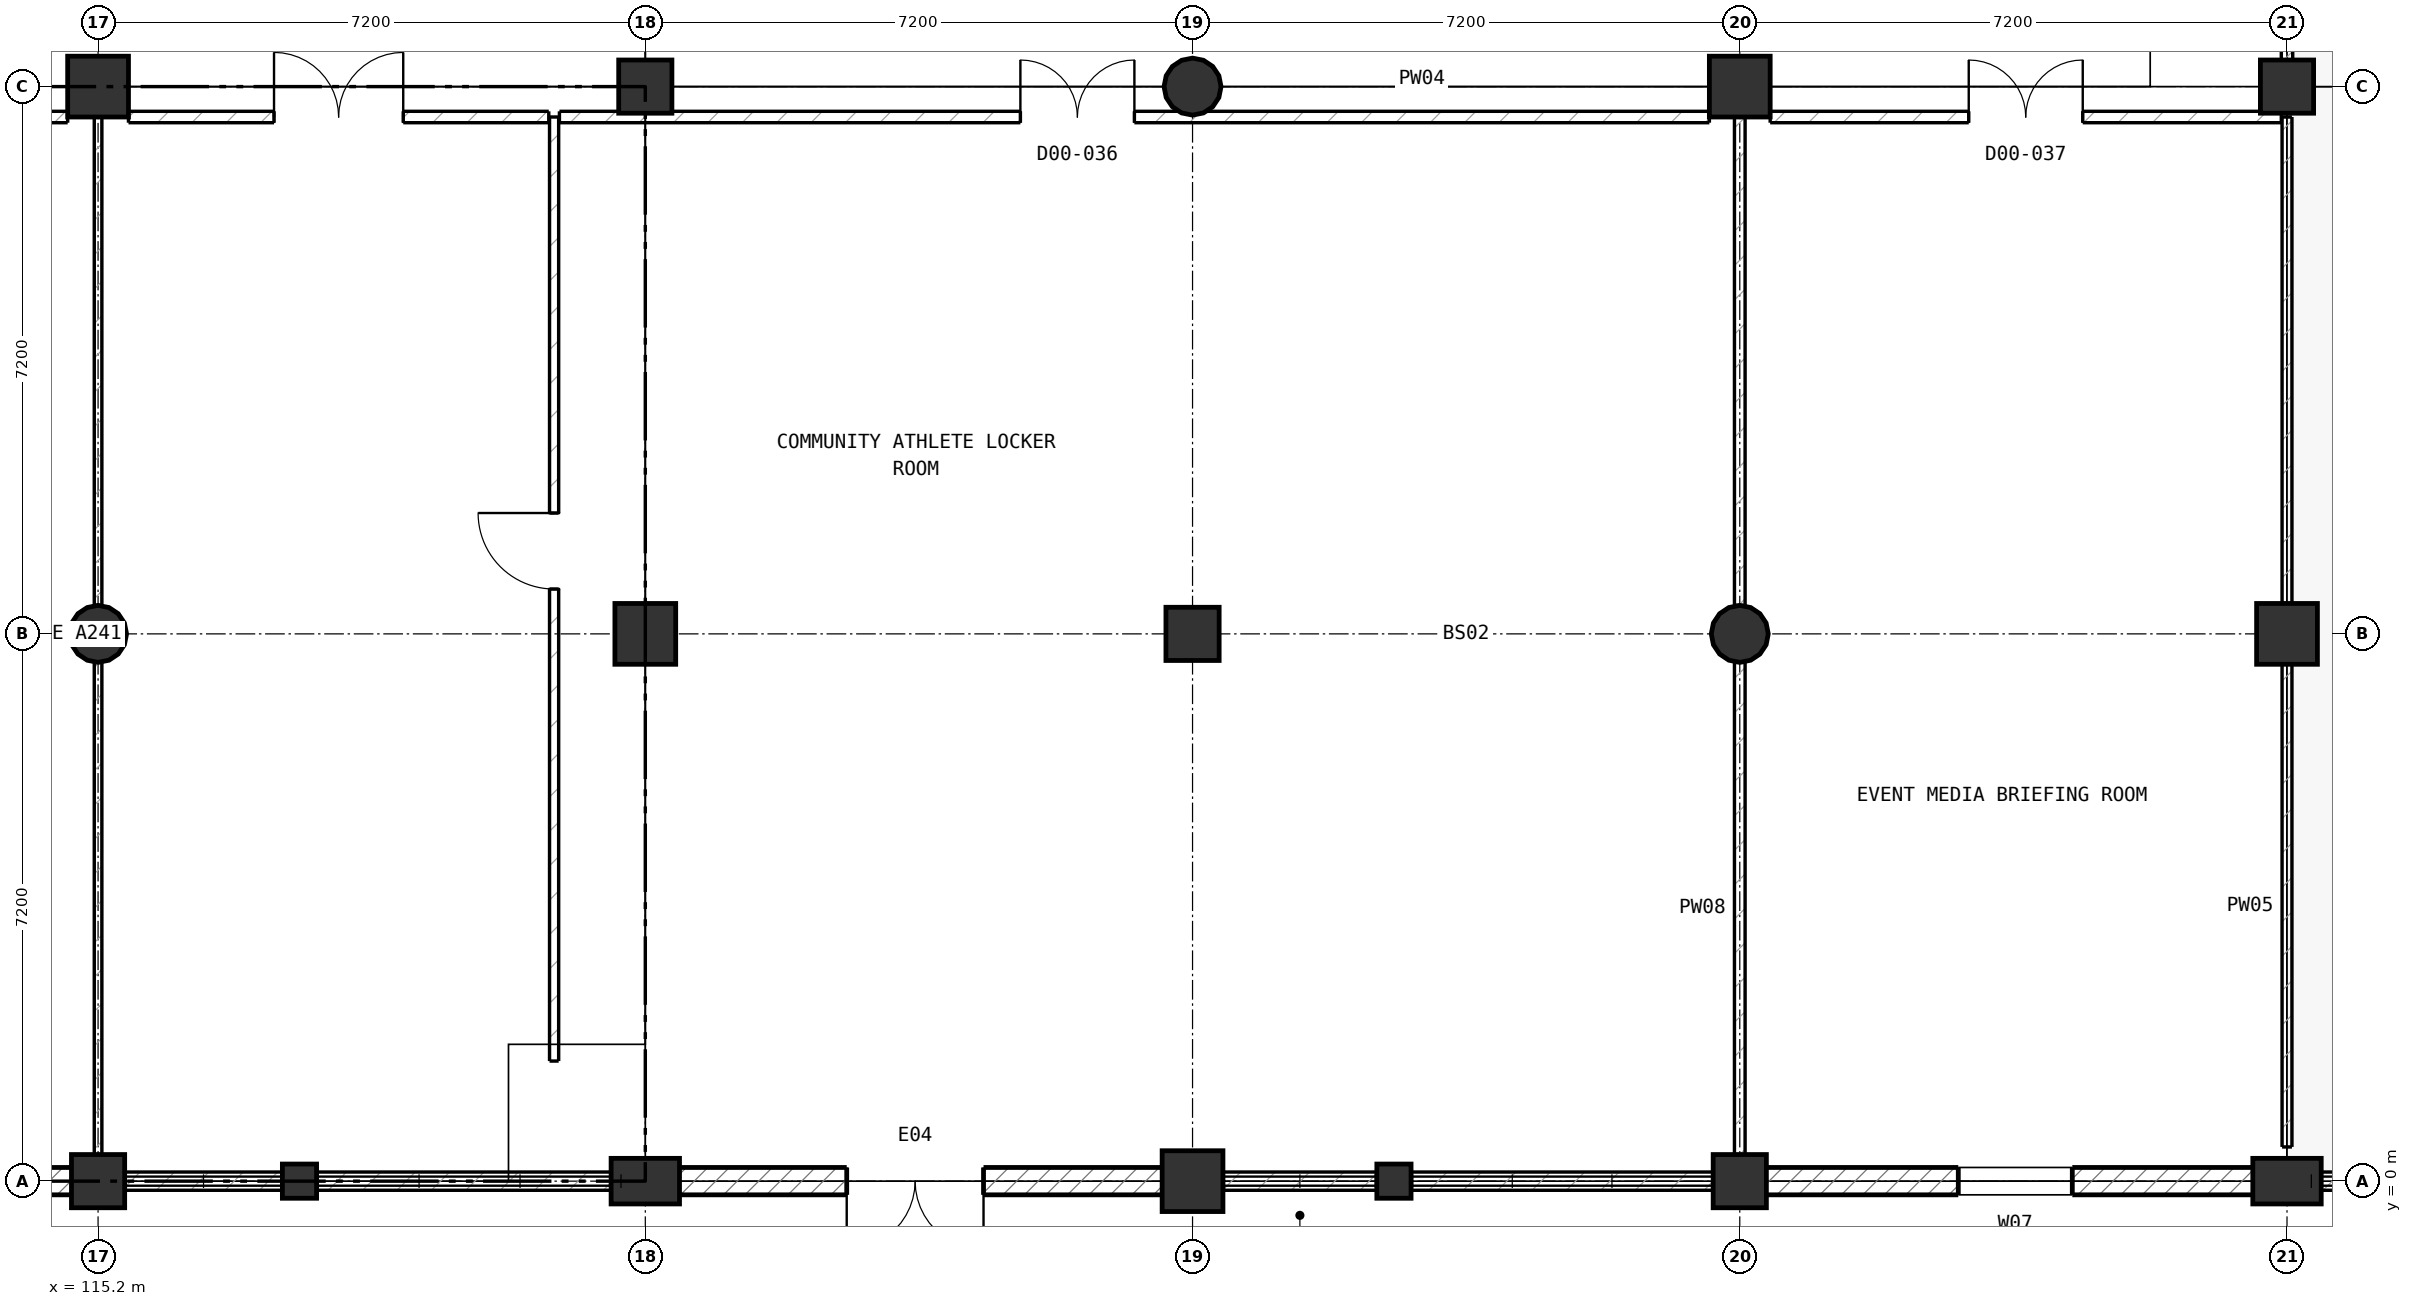
"""IFC4 building model, lengths in metres.
Left out: names, types, materials, properties, quantities, classifications, styles, units other than length and angle.
Written with IfcOpenShell. Run it as: python <this file> out.ifc"""

import sys

from ifc_helpers import new_model, si_unit, direction, frame, frame_2d, origin, origin_2d, place, context, subcontext, project, spatial, rectangle, circle, extrude, element, fill, save


model = new_model("IFC4")
c1 = context("Model", 3, precision=1e-05, world=origin(), true_north=direction((0.0, 1.0)))
c2 = subcontext(c1, "Body", "Model", "MODEL_VIEW")
j1 = project(units=[si_unit("LENGTHUNIT", "METRE"), si_unit("PLANEANGLEUNIT", "RADIAN")], contexts=[c1])
p1 = place(None, origin())
s1 = spatial("IfcSite", under=j1, at=p1, CompositionType="ELEMENT")
p2 = place(p1, origin())
s2 = spatial("IfcBuilding", under=s1, at=p2, CompositionType="ELEMENT")
p3 = place(p2, origin())
s3 = spatial("IfcBuildingStorey", under=s2, at=p3, CompositionType="ELEMENT", Elevation=0.0)
p4 = place(p3, frame((115.2, 0.0, 0.0), z_axis=(0.0, 0.0, 1.0), x_axis=(1.0, 0.0, 0.0)))
e1 = element("IfcColumn", 1, at=p4, inside=s3, PredefinedType="COLUMN", context=c2, shape_type="SweptSolid", body=[
    extrude(rectangle(XDim=0.7, YDim=0.7, at=origin_2d()), origin(), (0.0, 0.0, 1.0), 5.6),
])
p5 = place(p3, frame((115.2, 7.2, 0.0), z_axis=(0.0, 0.0, 1.0), x_axis=(1.0, 0.0, 0.0)))
e2 = element("IfcColumn", 2, at=p5, inside=s3, PredefinedType="COLUMN", context=c2, shape_type="SweptSolid", body=[
    extrude(circle(Radius=0.375, at=origin_2d()), origin(), (0.0, 0.0, 1.0), 5.6),
])
p6 = place(p3, frame((115.2, 14.4, 0.0), z_axis=(0.0, 0.0, 1.0), x_axis=(1.0, 0.0, 0.0)))
e3 = element("IfcColumn", 3, at=p6, inside=s3, PredefinedType="COLUMN", context=c2, shape_type="SweptSolid", body=[
    extrude(rectangle(XDim=0.8, YDim=0.8, at=origin_2d()), origin(), (0.0, 0.0, 1.0), 5.6),
])
p7 = place(p3, frame((122.4, 0.0, 0.0), z_axis=(0.0, 0.0, 1.0), x_axis=(1.0, 0.0, 0.0)))
e4 = element("IfcColumn", 4, at=p7, inside=s3, PredefinedType="COLUMN", context=c2, shape_type="SweptSolid", body=[
    extrude(rectangle(XDim=0.6, YDim=0.9, at=origin_2d()), origin(), (0.0, 0.0, 1.0), 5.6),
])
p8 = place(p3, frame((122.4, 7.2, 0.0), z_axis=(0.0, 0.0, 1.0), x_axis=(1.0, 0.0, 0.0)))
e5 = element("IfcColumn", 5, at=p8, inside=s3, PredefinedType="COLUMN", context=c2, shape_type="SweptSolid", body=[
    extrude(rectangle(XDim=0.8, YDim=0.8, at=origin_2d()), origin(), (0.0, 0.0, 1.0), 5.6),
])
p9 = place(p3, frame((122.4, 14.4, 0.0), z_axis=(0.0, 0.0, 1.0), x_axis=(1.0, 0.0, 0.0)))
e6 = element("IfcColumn", 6, at=p9, inside=s3, PredefinedType="COLUMN", context=c2, shape_type="SweptSolid", body=[
    extrude(rectangle(XDim=0.7, YDim=0.7, at=origin_2d()), origin(), (0.0, 0.0, 1.0), 5.6),
])
p10 = place(p3, frame((129.6, 0.0, 0.0), z_axis=(0.0, 0.0, 1.0), x_axis=(1.0, 0.0, 0.0)))
e7 = element("IfcColumn", 7, at=p10, inside=s3, PredefinedType="COLUMN", context=c2, shape_type="SweptSolid", body=[
    extrude(rectangle(XDim=0.8, YDim=0.8, at=origin_2d()), origin(), (0.0, 0.0, 1.0), 5.6),
])
p11 = place(p3, frame((129.6, 7.2, 0.0), z_axis=(0.0, 0.0, 1.0), x_axis=(1.0, 0.0, 0.0)))
e8 = element("IfcColumn", 8, at=p11, inside=s3, PredefinedType="COLUMN", context=c2, shape_type="SweptSolid", body=[
    extrude(rectangle(XDim=0.7, YDim=0.7, at=origin_2d()), origin(), (0.0, 0.0, 1.0), 5.6),
])
p12 = place(p3, frame((129.6, 14.4, 0.0), z_axis=(0.0, 0.0, 1.0), x_axis=(1.0, 0.0, 0.0)))
e9 = element("IfcColumn", 9, at=p12, inside=s3, PredefinedType="COLUMN", context=c2, shape_type="SweptSolid", body=[
    extrude(circle(Radius=0.375, at=origin_2d()), origin(), (0.0, 0.0, 1.0), 5.6),
])
p13 = place(p3, frame((136.8, 0.0, 0.0), z_axis=(0.0, 0.0, 1.0), x_axis=(1.0, 0.0, 0.0)))
e10 = element("IfcColumn", 10, at=p13, inside=s3, PredefinedType="COLUMN", context=c2, shape_type="SweptSolid", body=[
    extrude(rectangle(XDim=0.7, YDim=0.7, at=origin_2d()), origin(), (0.0, 0.0, 1.0), 5.6),
])
p14 = place(p3, frame((136.8, 7.2, 0.0), z_axis=(0.0, 0.0, 1.0), x_axis=(1.0, 0.0, 0.0)))
e11 = element("IfcColumn", 11, at=p14, inside=s3, PredefinedType="COLUMN", context=c2, shape_type="SweptSolid", body=[
    extrude(circle(Radius=0.375, at=origin_2d()), origin(), (0.0, 0.0, 1.0), 5.6),
])
p15 = place(p3, frame((136.8, 14.4, 0.0), z_axis=(0.0, 0.0, 1.0), x_axis=(1.0, 0.0, 0.0)))
e12 = element("IfcColumn", 12, at=p15, inside=s3, PredefinedType="COLUMN", context=c2, shape_type="SweptSolid", body=[
    extrude(rectangle(XDim=0.8, YDim=0.8, at=origin_2d()), origin(), (0.0, 0.0, 1.0), 5.6),
])
p16 = place(p3, frame((144.0, 0.0, 0.0), z_axis=(0.0, 0.0, 1.0), x_axis=(1.0, 0.0, 0.0)))
e13 = element("IfcColumn", 13, at=p16, inside=s3, PredefinedType="COLUMN", context=c2, shape_type="SweptSolid", body=[
    extrude(rectangle(XDim=0.6, YDim=0.9, at=origin_2d()), origin(), (0.0, 0.0, 1.0), 5.6),
])
p17 = place(p3, frame((144.0, 7.2, 0.0), z_axis=(0.0, 0.0, 1.0), x_axis=(1.0, 0.0, 0.0)))
e14 = element("IfcColumn", 14, at=p17, inside=s3, PredefinedType="COLUMN", context=c2, shape_type="SweptSolid", body=[
    extrude(rectangle(XDim=0.8, YDim=0.8, at=origin_2d()), origin(), (0.0, 0.0, 1.0), 5.6),
])
p18 = place(p3, frame((144.0, 14.4, 0.0), z_axis=(0.0, 0.0, 1.0), x_axis=(1.0, 0.0, 0.0)))
e15 = element("IfcColumn", 15, at=p18, inside=s3, PredefinedType="COLUMN", context=c2, shape_type="SweptSolid", body=[
    extrude(rectangle(XDim=0.7, YDim=0.7, at=origin_2d()), origin(), (0.0, 0.0, 1.0), 5.6),
])
for number, where, z_axis, x_axis in (
    (16, (117.85, 0.0, 0.0), (0.0, 0.0, 1.0), (1.0, 0.0, 0.0)),
    (17, (132.25, 0.0, 0.0), (0.0, 0.0, 1.0), (1.0, 0.0, 0.0)),
):
    element("IfcColumn", number, at=place(p3, frame(where, z_axis=z_axis, x_axis=x_axis)), inside=s3, PredefinedType="PILASTER", context=c2, shape_type="SweptSolid", body=[
        extrude(rectangle(XDim=0.45, YDim=0.45, at=origin_2d()), origin(), (0.0, 0.0, 1.0), 5.6),
    ])
p19 = place(p3, frame((150.815, 0.0, 0.0), z_axis=(0.0, 0.0, 1.0), x_axis=(-1.0, 0.0, 0.0)))
e18 = element("IfcWall", 18, at=p19, inside=s3, PredefinedType="SOLIDWALL", context=c2, shape_type="SweptSolid", body=[
    extrude(rectangle(XDim=6.53, YDim=0.24, at=frame_2d((3.265, 0.0))), origin(), (0.0, 0.0, 1.0), 0.35),
])
p20 = place(p3, frame((143.715, 0.0, 0.0), z_axis=(0.0, 0.0, 1.0), x_axis=(-1.0, 0.0, 0.0)))
e19 = element("IfcWall", 19, at=p20, inside=s3, PredefinedType="SOLIDWALL", context=c2, shape_type="SweptSolid", body=[
    extrude(rectangle(XDim=6.58, YDim=0.36, at=frame_2d((3.29, 0.0))), origin(), (0.0, 0.0, 1.0), 5.6),
])
p21 = place(p20, frame((2.54, 0.0, 0.9)))
e20 = element("IfcOpeningElement", 20, at=p21, cuts=e19, PredefinedType="OPENING", context=c2, shape_type="SweptSolid", body=[
    extrude(rectangle(XDim=1.5, YDim=2.7, at=frame_2d((0.75, 1.35))), frame((0.0, 0.19, 0.0), z_axis=(0.0, -1.0, 0.0), x_axis=(1.0, 0.0, 0.0)), (0.0, 0.0, 1.0), 0.38),
])
p22 = place(p3, frame((136.465, 0.0, 0.0), z_axis=(0.0, 0.0, 1.0), x_axis=(-1.0, 0.0, 0.0)))
e21 = element("IfcWall", 21, at=p22, inside=s3, PredefinedType="SOLIDWALL", context=c2, shape_type="SweptSolid", body=[
    extrude(rectangle(XDim=4.005, YDim=0.24, at=frame_2d((2.002, 0.0))), origin(), (0.0, 0.0, 1.0), 0.35),
])
p23 = place(p3, frame((132.04, 0.0, 0.0), z_axis=(0.0, 0.0, 1.0), x_axis=(-1.0, 0.0, 0.0)))
e22 = element("IfcWall", 22, at=p23, inside=s3, PredefinedType="SOLIDWALL", context=c2, shape_type="SweptSolid", body=[
    extrude(rectangle(XDim=2.055, YDim=0.24, at=frame_2d((1.027, 0.0))), origin(), (0.0, 0.0, 1.0), 0.35),
])
p24 = place(p3, frame((129.215, 0.0, 0.0), z_axis=(0.0, 0.0, 1.0), x_axis=(-1.0, 0.0, 0.0)))
e23 = element("IfcWall", 23, at=p24, inside=s3, PredefinedType="SOLIDWALL", context=c2, shape_type="SweptSolid", body=[
    extrude(rectangle(XDim=6.53, YDim=0.36, at=frame_2d((3.265, 0.0))), origin(), (0.0, 0.0, 1.0), 5.6),
])
p25 = place(p24, frame((2.365, 0.0, 0.0)))
e24 = element("IfcOpeningElement", 24, at=p25, cuts=e23, PredefinedType="OPENING", context=c2, shape_type="SweptSolid", body=[
    extrude(rectangle(XDim=1.8, YDim=2.2, at=frame_2d((0.9, 1.1))), frame((0.0, 0.19, 0.0), z_axis=(0.0, -1.0, 0.0), x_axis=(1.0, 0.0, 0.0)), (0.0, 0.0, 1.0), 0.38),
])
p26 = place(p3, frame((122.115, 0.0, 0.0), z_axis=(0.0, 0.0, 1.0), x_axis=(-1.0, 0.0, 0.0)))
e25 = element("IfcWall", 25, at=p26, inside=s3, PredefinedType="SOLIDWALL", context=c2, shape_type="SweptSolid", body=[
    extrude(rectangle(XDim=4.055, YDim=0.24, at=frame_2d((2.027, 0.0))), origin(), (0.0, 0.0, 1.0), 0.35),
])
p27 = place(p3, frame((117.64, 0.0, 0.0), z_axis=(0.0, 0.0, 1.0), x_axis=(-1.0, 0.0, 0.0)))
e26 = element("IfcWall", 26, at=p27, inside=s3, PredefinedType="SOLIDWALL", context=c2, shape_type="SweptSolid", body=[
    extrude(rectangle(XDim=2.105, YDim=0.24, at=frame_2d((1.052, 0.0))), origin(), (0.0, 0.0, 1.0), 0.35),
])
p28 = place(p3, frame((114.865, 0.0, 0.0), z_axis=(0.0, 0.0, 1.0), x_axis=(-1.0, 0.0, 0.0)))
e27 = element("IfcWall", 27, at=p28, inside=s3, PredefinedType="SOLIDWALL", context=c2, shape_type="SweptSolid", body=[
    extrude(rectangle(XDim=6.48, YDim=0.36, at=frame_2d((3.24, 0.0))), origin(), (0.0, 0.0, 1.0), 5.6),
])
p29 = place(p28, frame((2.49, 0.0, 0.9)))
e28 = element("IfcOpeningElement", 28, at=p29, cuts=e27, PredefinedType="OPENING", context=c2, shape_type="SweptSolid", body=[
    extrude(rectangle(XDim=1.5, YDim=2.7, at=frame_2d((0.75, 1.35))), frame((0.0, 0.19, 0.0), z_axis=(0.0, -1.0, 0.0), x_axis=(1.0, 0.0, 0.0)), (0.0, 0.0, 1.0), 0.38),
])
p30 = place(p3, frame((115.2, 0.35, 0.0), z_axis=(0.0, 0.0, 1.0), x_axis=(0.0, 1.0, 0.0)))
e29 = element("IfcWall", 29, at=p30, inside=s3, PredefinedType="PARTITIONING", context=c2, shape_type="SweptSolid", body=[
    extrude(rectangle(XDim=6.475, YDim=0.1, at=frame_2d((3.237, 0.0))), origin(), (0.0, 0.0, 1.0), 4.8),
])
p31 = place(p3, frame((115.2, 7.575, 0.0), z_axis=(0.0, 0.0, 1.0), x_axis=(0.0, 1.0, 0.0)))
e30 = element("IfcWall", 30, at=p31, inside=s3, PredefinedType="PARTITIONING", context=c2, shape_type="SweptSolid", body=[
    extrude(rectangle(XDim=6.425, YDim=0.1, at=frame_2d((3.212, 0.0))), origin(), (0.0, 0.0, 1.0), 4.8),
])
p32 = place(p3, frame((136.8, 0.35, 0.0), z_axis=(0.0, 0.0, 1.0), x_axis=(0.0, 1.0, 0.0)))
e31 = element("IfcWall", 31, at=p32, inside=s3, PredefinedType="PARTITIONING", context=c2, shape_type="SweptSolid", body=[
    extrude(rectangle(XDim=6.475, YDim=0.14, at=frame_2d((3.237, 0.0))), origin(), (0.0, 0.0, 1.0), 5.3),
])
p33 = place(p3, frame((136.8, 7.575, 0.0), z_axis=(0.0, 0.0, 1.0), x_axis=(0.0, 1.0, 0.0)))
e32 = element("IfcWall", 32, at=p33, inside=s3, PredefinedType="PARTITIONING", context=c2, shape_type="SweptSolid", body=[
    extrude(rectangle(XDim=6.425, YDim=0.14, at=frame_2d((3.212, 0.0))), origin(), (0.0, 0.0, 1.0), 5.3),
])
p34 = place(p3, frame((144.0, 0.45, 0.0), z_axis=(0.0, 0.0, 1.0), x_axis=(0.0, 1.0, 0.0)))
e33 = element("IfcWall", 33, at=p34, inside=s3, PredefinedType="PARTITIONING", context=c2, shape_type="SweptSolid", body=[
    extrude(rectangle(XDim=6.35, YDim=0.13, at=frame_2d((3.175, 0.0))), origin(), (0.0, 0.0, 1.0), 4.79),
])
p35 = place(p3, frame((144.0, 7.6, 0.0), z_axis=(0.0, 0.0, 1.0), x_axis=(0.0, 1.0, 0.0)))
e34 = element("IfcWall", 34, at=p35, inside=s3, PredefinedType="PARTITIONING", context=c2, shape_type="SweptSolid", body=[
    extrude(rectangle(XDim=6.4, YDim=0.13, at=frame_2d((3.2, 0.0))), origin(), (0.0, 0.0, 1.0), 4.79),
])
p36 = place(p3, frame((121.2, 1.58, 0.0), z_axis=(0.0, 0.0, 1.0), x_axis=(0.0, 1.0, 0.0)))
e35 = element("IfcWall", 35, at=p36, inside=s3, PredefinedType="PARTITIONING", context=c2, shape_type="SweptSolid", body=[
    extrude(rectangle(XDim=12.42, YDim=0.12, at=frame_2d((6.21, 0.0))), origin(), (0.0, 0.0, 1.0), 5.3),
])
p37 = place(p36, frame((6.21, 0.0, 0.0)))
e36 = element("IfcOpeningElement", 36, at=p37, cuts=e35, PredefinedType="OPENING", context=c2, shape_type="SweptSolid", body=[
    extrude(rectangle(XDim=1.0, YDim=2.1, at=frame_2d((0.5, 1.05))), frame((0.0, 0.07, 0.0), z_axis=(0.0, -1.0, 0.0), x_axis=(1.0, 0.0, 0.0)), (0.0, 0.0, 1.0), 0.14),
])
p38 = place(p3, frame((144.0, 14.75, 0.0), z_axis=(0.0, 0.0, 1.0), x_axis=(0.0, 1.0, 0.0)))
e37 = element("IfcWall", 37, at=p38, inside=s3, PredefinedType="PARTITIONING", context=c2, shape_type="SweptSolid", body=[
    extrude(rectangle(XDim=3.04, YDim=0.15, at=frame_2d((1.52, 0.0))), origin(), (0.0, 0.0, 1.0), 4.79),
])
p39 = place(p3, frame((104.475, 14.0, 0.0), z_axis=(0.0, 0.0, 1.0), x_axis=(1.0, 0.0, 0.0)))
e38 = element("IfcWall", 38, at=p39, inside=s3, PredefinedType="PARTITIONING", context=c2, shape_type="SweptSolid", body=[
    extrude(rectangle(XDim=10.325, YDim=0.15, at=frame_2d((5.163, 0.0))), origin(), (0.0, 0.0, 1.0), 5.3),
])
p40 = place(p39, frame((4.413, 0.0, 0.0)))
e39 = element("IfcOpeningElement", 39, at=p40, cuts=e38, PredefinedType="OPENING", context=c2, shape_type="SweptSolid", body=[
    extrude(rectangle(XDim=1.5, YDim=2.2, at=frame_2d((0.75, 1.1))), frame((0.0, 0.085, 0.0), z_axis=(0.0, -1.0, 0.0), x_axis=(1.0, 0.0, 0.0)), (0.0, 0.0, 1.0), 0.17),
])
p41 = place(p3, frame((115.6, 14.0, 0.0), z_axis=(0.0, 0.0, 1.0), x_axis=(1.0, 0.0, 0.0)))
e40 = element("IfcWall", 40, at=p41, inside=s3, PredefinedType="PARTITIONING", context=c2, shape_type="SweptSolid", body=[
    extrude(rectangle(XDim=5.53, YDim=0.15, at=frame_2d((2.765, 0.0))), origin(), (0.0, 0.0, 1.0), 5.3),
])
p42 = place(p41, frame((1.915, 0.0, 0.0)))
e41 = element("IfcOpeningElement", 41, at=p42, cuts=e40, PredefinedType="OPENING", context=c2, shape_type="SweptSolid", body=[
    extrude(rectangle(XDim=1.7, YDim=2.3, at=frame_2d((0.85, 1.15))), frame((0.0, 0.085, 0.0), z_axis=(0.0, -1.0, 0.0), x_axis=(1.0, 0.0, 0.0)), (0.0, 0.0, 1.0), 0.17),
])
p43 = place(p3, frame((121.27, 14.0, 0.0), z_axis=(0.0, 0.0, 1.0), x_axis=(1.0, 0.0, 0.0)))
e42 = element("IfcWall", 42, at=p43, inside=s3, PredefinedType="PARTITIONING", context=c2, shape_type="SweptSolid", body=[
    extrude(rectangle(XDim=15.13, YDim=0.15, at=frame_2d((7.565, 0.0))), origin(), (0.0, 0.0, 1.0), 5.3),
])
p44 = place(p43, frame((6.065, 0.0, 0.0)))
e43 = element("IfcOpeningElement", 43, at=p44, cuts=e42, PredefinedType="OPENING", context=c2, shape_type="SweptSolid", body=[
    extrude(rectangle(XDim=1.5, YDim=2.2, at=frame_2d((0.75, 1.1))), frame((0.0, 0.085, 0.0), z_axis=(0.0, -1.0, 0.0), x_axis=(1.0, 0.0, 0.0)), (0.0, 0.0, 1.0), 0.17),
])
p45 = place(p3, frame((137.2, 14.0, 0.0), z_axis=(0.0, 0.0, 1.0), x_axis=(1.0, 0.0, 0.0)))
e44 = element("IfcWall", 44, at=p45, inside=s3, PredefinedType="PARTITIONING", context=c2, shape_type="SweptSolid", body=[
    extrude(rectangle(XDim=6.725, YDim=0.15, at=frame_2d((3.363, 0.0))), origin(), (0.0, 0.0, 1.0), 5.3),
])
p46 = place(p45, frame((2.613, 0.0, 0.0)))
e45 = element("IfcOpeningElement", 45, at=p46, cuts=e44, PredefinedType="OPENING", context=c2, shape_type="SweptSolid", body=[
    extrude(rectangle(XDim=1.5, YDim=2.2, at=frame_2d((0.75, 1.1))), frame((0.0, 0.085, 0.0), z_axis=(0.0, -1.0, 0.0), x_axis=(1.0, 0.0, 0.0)), (0.0, 0.0, 1.0), 0.17),
])
p47 = place(p21, origin())
e46 = element("IfcWindow", 46, at=p47, inside=s3, PartitioningType="SINGLE_PANEL", PredefinedType="WINDOW", context=c2, shape_type="SweptSolid", body=[
    extrude(rectangle(XDim=1.5, YDim=2.7, at=frame_2d((0.75, 1.35))), frame((0.0, 0.03, 0.0), z_axis=(0.0, -1.0, 0.0), x_axis=(1.0, 0.0, 0.0)), (0.0, 0.0, 1.0), 0.06),
])
fill(e20, e46)
p48 = place(p25, origin())
e47 = element("IfcDoor", 47, at=p48, inside=s3, OperationType="DOUBLE_DOOR_SINGLE_SWING", PredefinedType="DOOR", context=c2, shape_type="SweptSolid", body=[
    extrude(rectangle(XDim=1.8, YDim=2.2, at=frame_2d((0.9, 1.1))), frame((0.0, 0.025, 0.0), z_axis=(0.0, -1.0, 0.0), x_axis=(1.0, 0.0, 0.0)), (0.0, 0.0, 1.0), 0.05),
])
fill(e24, e47)
p49 = place(p37, origin())
e48 = element("IfcDoor", 48, at=p49, inside=s3, OperationType="SINGLE_SWING_RIGHT", PredefinedType="DOOR", context=c2, shape_type="SweptSolid", body=[
    extrude(rectangle(XDim=1.0, YDim=2.1, at=frame_2d((0.5, 1.05))), frame((0.0, 0.025, 0.0), z_axis=(0.0, -1.0, 0.0), x_axis=(1.0, 0.0, 0.0)), (0.0, 0.0, 1.0), 0.05),
])
fill(e36, e48)
p50 = place(p42, origin())
e49 = element("IfcDoor", 49, at=p50, inside=s3, OperationType="DOUBLE_DOOR_SINGLE_SWING", PredefinedType="DOOR", context=c2, shape_type="SweptSolid", body=[
    extrude(rectangle(XDim=1.7, YDim=2.3, at=frame_2d((0.85, 1.15))), frame((0.0, 0.025, 0.0), z_axis=(0.0, -1.0, 0.0), x_axis=(1.0, 0.0, 0.0)), (0.0, 0.0, 1.0), 0.05),
])
fill(e41, e49)
p51 = place(p44, origin())
e50 = element("IfcDoor", 50, at=p51, inside=s3, OperationType="DOUBLE_DOOR_SINGLE_SWING", PredefinedType="DOOR", context=c2, shape_type="SweptSolid", body=[
    extrude(rectangle(XDim=1.5, YDim=2.2, at=frame_2d((0.75, 1.1))), frame((0.0, 0.025, 0.0), z_axis=(0.0, -1.0, 0.0), x_axis=(1.0, 0.0, 0.0)), (0.0, 0.0, 1.0), 0.05),
])
fill(e43, e50)
p52 = place(p46, origin())
e51 = element("IfcDoor", 51, at=p52, inside=s3, OperationType="DOUBLE_DOOR_SINGLE_SWING", PredefinedType="DOOR", context=c2, shape_type="SweptSolid", body=[
    extrude(rectangle(XDim=1.5, YDim=2.2, at=frame_2d((0.75, 1.1))), frame((0.0, 0.025, 0.0), z_axis=(0.0, -1.0, 0.0), x_axis=(1.0, 0.0, 0.0)), (0.0, 0.0, 1.0), 0.05),
])
fill(e45, e51)
save(model, sys.argv[1])
